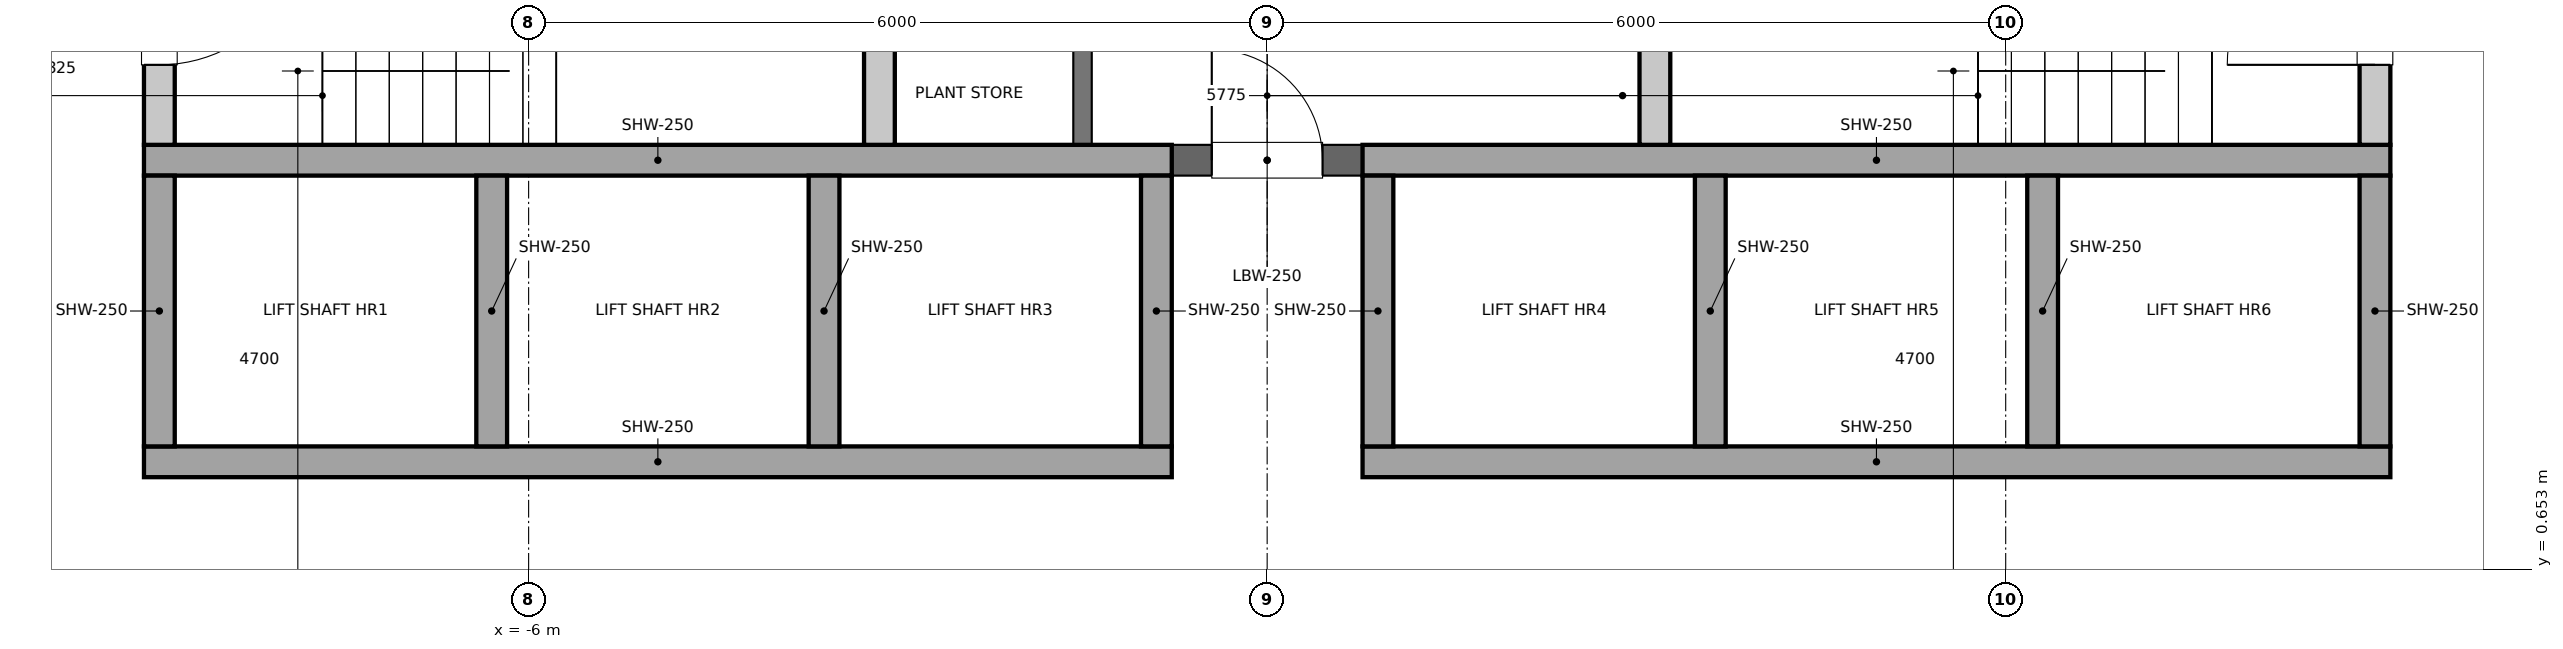
"""IFC4 building model, lengths in metres.
Left out: names, types, materials, properties, quantities, classifications, styles, units other than length and angle.
Written with IfcOpenShell. Run it as: python <this file> out.ifc"""

import sys

from ifc_helpers import new_model, si_unit, direction, frame, frame_2d, origin, place, context, subcontext, project, spatial, rectangle, extrude, element, fill, save


model = new_model("IFC4")
c1 = context("Model", 3, precision=1e-05, world=origin(), true_north=direction((0.0, 1.0)))
c2 = subcontext(c1, "Body", "Model", "MODEL_VIEW")
j1 = project(units=[si_unit("LENGTHUNIT", "METRE"), si_unit("PLANEANGLEUNIT", "RADIAN")], contexts=[c1])
p1 = place(None, origin())
s1 = spatial("IfcSite", under=j1, at=p1, CompositionType="ELEMENT")
p2 = place(p1, origin())
s2 = spatial("IfcBuilding", under=s1, at=p2, CompositionType="ELEMENT")
p3 = place(p2, frame((0.0, 0.0, 249.6)))
s3 = spatial("IfcBuildingStorey", under=s2, at=p3, CompositionType="ELEMENT", Elevation=249.6)
p4 = place(p3, frame((-1.5, 4.1, 0.0), z_axis=(0.0, 0.0, 1.0), x_axis=(0.0, 1.0, 0.0)))
e1 = element("IfcWall", 1, at=p4, inside=s3, PredefinedType="PARTITIONING", context=c2, shape_type="SweptSolid", body=[
    extrude(rectangle(XDim=2.5, YDim=0.15, at=frame_2d((1.25, 0.0))), origin(), (0.0, 0.0, 1.0), 5.25),
])
p5 = place(p4, frame((0.8, 0.0, 0.0)))
e2 = element("IfcOpeningElement", 2, at=p5, cuts=e1, PredefinedType="OPENING", context=c2, shape_type="SweptSolid", body=[
    extrude(rectangle(XDim=0.9, YDim=2.1, at=frame_2d((0.45, 1.05))), frame((0.0, 0.075, 0.0), z_axis=(0.0, -1.0, 0.0), x_axis=(1.0, 0.0, 0.0)), (0.0, 0.0, 1.0), 0.15),
])
p6 = place(p3, frame((-9.0, 4.1, 0.0), z_axis=(0.0, 0.0, 1.0), x_axis=(0.0, 1.0, 0.0)))
e3 = element("IfcWall", 3, at=p6, inside=s3, PredefinedType="SOLIDWALL", context=c2, shape_type="SweptSolid", body=[
    extrude(rectangle(XDim=2.5, YDim=0.25, at=frame_2d((1.25, 0.0))), origin(), (0.0, 0.0, 1.0), 5.25),
])
p7 = place(p6, frame((0.65, 0.0, 0.0)))
e4 = element("IfcOpeningElement", 4, at=p7, cuts=e3, PredefinedType="OPENING", context=c2, shape_type="SweptSolid", body=[
    extrude(rectangle(XDim=1.2, YDim=2.1, at=frame_2d((0.6, 1.05))), frame((0.0, 0.125, 0.0), z_axis=(0.0, -1.0, 0.0), x_axis=(1.0, 0.0, 0.0)), (0.0, 0.0, 1.0), 0.25),
])
p8 = place(p3, frame((9.0, 4.1, 0.0), z_axis=(0.0, 0.0, 1.0), x_axis=(0.0, 1.0, 0.0)))
e5 = element("IfcWall", 5, at=p8, inside=s3, PredefinedType="SOLIDWALL", context=c2, shape_type="SweptSolid", body=[
    extrude(rectangle(XDim=2.5, YDim=0.25, at=frame_2d((1.25, 0.0))), origin(), (0.0, 0.0, 1.0), 5.25),
])
p9 = place(p8, frame((0.65, 0.0, 0.0)))
e6 = element("IfcOpeningElement", 6, at=p9, cuts=e5, PredefinedType="OPENING", context=c2, shape_type="SweptSolid", body=[
    extrude(rectangle(XDim=1.2, YDim=2.1, at=frame_2d((0.6, 1.05))), frame((0.0, 0.125, 0.0), z_axis=(0.0, -1.0, 0.0), x_axis=(1.0, 0.0, 0.0)), (0.0, 0.0, 1.0), 0.25),
])
for number, where, z_axis, x_axis in (
    (7, (-3.15, 4.1, 0.0), (0.0, 0.0, 1.0), (0.0, 1.0, 0.0)),
    (8, (3.15, 4.1, 0.0), (0.0, 0.0, 1.0), (0.0, 1.0, 0.0)),
):
    element("IfcWall", number, at=place(p3, frame(where, z_axis=z_axis, x_axis=x_axis)), inside=s3, PredefinedType="SOLIDWALL", context=c2, shape_type="SweptSolid", body=[
        extrude(rectangle(XDim=2.5, YDim=0.25, at=frame_2d((1.25, 0.0))), origin(), (0.0, 0.0, 1.0), 5.25),
    ])
p10 = place(p3, frame((-0.775, 3.975, 0.0), z_axis=(0.0, 0.0, 1.0), x_axis=(1.0, 0.0, 0.0)))
e9 = element("IfcWall", 9, at=p10, inside=s3, PredefinedType="PARTITIONING", context=c2, shape_type="SweptSolid", body=[
    extrude(rectangle(XDim=1.55, YDim=0.25, at=frame_2d((0.775, 0.0))), origin(), (0.0, 0.0, 1.0), 5.25),
])
p11 = place(p10, frame((0.325, 0.0, 0.0)))
e10 = element("IfcOpeningElement", 10, at=p11, cuts=e9, PredefinedType="OPENING", context=c2, shape_type="SweptSolid", body=[
    extrude(rectangle(XDim=0.9, YDim=2.1, at=frame_2d((0.45, 1.05))), frame((0.0, 0.125, 0.0), z_axis=(0.0, -1.0, 0.0), x_axis=(1.0, 0.0, 0.0)), (0.0, 0.0, 1.0), 0.25),
])
for number, where, z_axis, x_axis in (
    (11, (-9.125, 1.525, 0.0), (0.0, 0.0, 1.0), (1.0, 0.0, 0.0)),
    (12, (0.775, 1.525, 0.0), (0.0, 0.0, 1.0), (1.0, 0.0, 0.0)),
    (13, (-9.125, 3.975, 0.0), (0.0, 0.0, 1.0), (1.0, 0.0, 0.0)),
    (14, (0.775, 3.975, 0.0), (0.0, 0.0, 1.0), (1.0, 0.0, 0.0)),
):
    element("IfcWall", number, at=place(p3, frame(where, z_axis=z_axis, x_axis=x_axis)), inside=s3, PredefinedType="SOLIDWALL", context=c2, shape_type="SweptSolid", body=[
        extrude(rectangle(XDim=8.35, YDim=0.25, at=frame_2d((4.175, 0.0))), origin(), (0.0, 0.0, 1.0), 5.25),
    ])
for number, where, z_axis, x_axis in (
    (15, (-9.0, 1.65, 0.0), (0.0, 0.0, 1.0), (0.0, 1.0, 0.0)),
    (16, (9.0, 1.65, 0.0), (0.0, 0.0, 1.0), (0.0, 1.0, 0.0)),
    (17, (-6.3, 1.65, 0.0), (0.0, 0.0, 1.0), (0.0, 1.0, 0.0)),
    (18, (6.3, 1.65, 0.0), (0.0, 0.0, 1.0), (0.0, 1.0, 0.0)),
    (19, (-3.6, 1.65, 0.0), (0.0, 0.0, 1.0), (0.0, 1.0, 0.0)),
    (20, (3.6, 1.65, 0.0), (0.0, 0.0, 1.0), (0.0, 1.0, 0.0)),
    (21, (-0.9, 1.65, 0.0), (0.0, 0.0, 1.0), (0.0, 1.0, 0.0)),
    (22, (0.9, 1.65, 0.0), (0.0, 0.0, 1.0), (0.0, 1.0, 0.0)),
):
    element("IfcWall", number, at=place(p3, frame(where, z_axis=z_axis, x_axis=x_axis)), inside=s3, PredefinedType="SOLIDWALL", context=c2, shape_type="SweptSolid", body=[
        extrude(rectangle(XDim=2.2, YDim=0.25, at=frame_2d((1.1, 0.0))), origin(), (0.0, 0.0, 1.0), 5.25),
    ])
p12 = place(p7, origin())
e23 = element("IfcDoor", 23, at=p12, inside=s3, OperationType="SINGLE_SWING_RIGHT", PredefinedType="DOOR", context=c2, shape_type="SweptSolid", body=[
    extrude(rectangle(XDim=1.2, YDim=2.1, at=frame_2d((0.6, 1.05))), frame((0.0, 0.025, 0.0), z_axis=(0.0, -1.0, 0.0), x_axis=(1.0, 0.0, 0.0)), (0.0, 0.0, 1.0), 0.05),
])
fill(e4, e23)
p13 = place(p9, origin())
e24 = element("IfcDoor", 24, at=p13, inside=s3, OperationType="SINGLE_SWING_LEFT", PredefinedType="DOOR", context=c2, shape_type="SweptSolid", body=[
    extrude(rectangle(XDim=1.2, YDim=2.1, at=frame_2d((0.6, 1.05))), frame((0.0, 0.025, 0.0), z_axis=(0.0, -1.0, 0.0), x_axis=(1.0, 0.0, 0.0)), (0.0, 0.0, 1.0), 0.05),
])
fill(e6, e24)
p14 = place(p11, origin())
e25 = element("IfcDoor", 25, at=p14, inside=s3, OperationType="SINGLE_SWING_LEFT", PredefinedType="DOOR", context=c2, shape_type="SweptSolid", body=[
    extrude(rectangle(XDim=0.9, YDim=2.1, at=frame_2d((0.45, 1.05))), frame((0.0, 0.025, 0.0), z_axis=(0.0, -1.0, 0.0), x_axis=(1.0, 0.0, 0.0)), (0.0, 0.0, 1.0), 0.05),
])
fill(e10, e25)
save(model, sys.argv[1])
